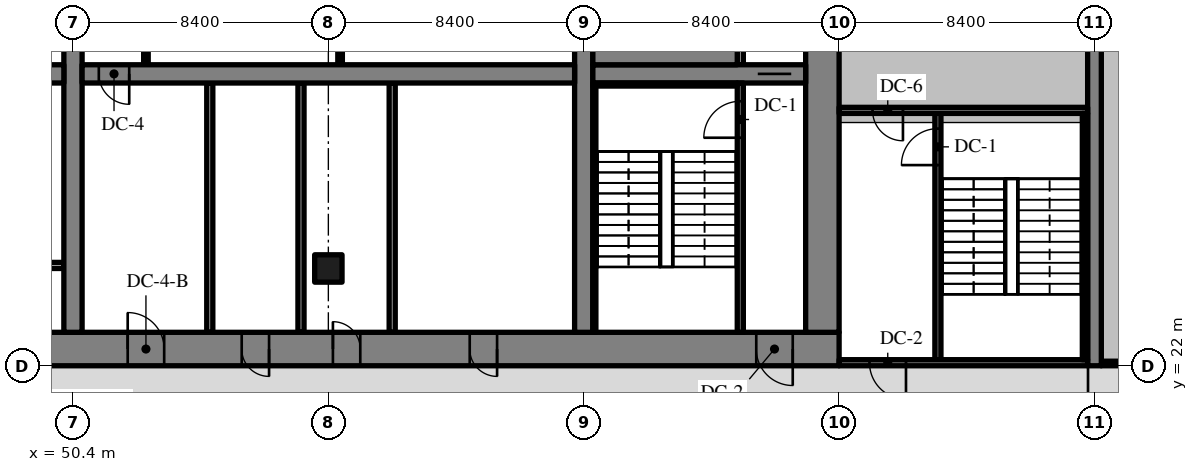
"""IFC4 building model, lengths in metres.
Left out: names, types, materials, properties, quantities, classifications, styles, units other than length and angle.
Written with IfcOpenShell. Run it as: python <this file> out.ifc"""

import sys

from ifc_helpers import new_model, si_unit, direction, frame, frame_2d, origin, origin_2d, place, context, subcontext, project, spatial, rectangle, extrude, source, transform, mapped, element, fill, save


model = new_model("IFC4")
c1 = context("Model", 3, precision=1e-05, world=origin(), true_north=direction((0.0, 1.0)))
c2 = subcontext(c1, "Body", "Model", "MODEL_VIEW")
j1 = project(units=[si_unit("LENGTHUNIT", "METRE"), si_unit("PLANEANGLEUNIT", "RADIAN")], contexts=[c1])
p1 = place(None, origin())
s1 = spatial("IfcSite", under=j1, at=p1, CompositionType="ELEMENT")
p2 = place(p1, origin())
s2 = spatial("IfcBuilding", under=s1, at=p2, CompositionType="ELEMENT")
p3 = place(p2, frame((0.0, 0.0, -9.0)))
s3 = spatial("IfcBuildingStorey", under=s2, at=p3, CompositionType="ELEMENT", Elevation=-9.0)
m1 = source(origin(), c2, "Body", "SweptSolid", [
    extrude(rectangle(XDim=50.4, YDim=1.1, at=frame_2d((25.2, 0.0))), origin(), (0.0, 0.0, 1.0), 4.22),
])
p4 = place(p3, frame((25.2, 22.55, 0.0), z_axis=(0.0, 0.0, 1.0), x_axis=(1.0, 0.0, 0.0)))
e1 = element("IfcWall", 1, at=p4, inside=s3, PredefinedType="SHEAR", context=c2, shape_type="MappedRepresentation", body=[
    mapped(m1, transform((0.0, 0.0, 0.0), scale=1.0)),
])
m2 = source(origin(), c2, "Body", "SweptSolid", [
    extrude(rectangle(XDim=1.8, YDim=2.1, at=frame_2d((0.9, 1.05))), frame((0.0, 0.56, 0.0), z_axis=(0.0, -1.0, 0.0), x_axis=(1.0, 0.0, 0.0)), (0.0, 0.0, 1.0), 1.12),
])
p5 = place(p4, frame((15.9, 0.0, 0.0)))
e2 = element("IfcOpeningElement", 2, at=p5, cuts=e1, PredefinedType="OPENING", context=c2, shape_type="MappedRepresentation", body=[
    mapped(m2, transform((0.0, 0.0, 0.0), scale=1.0)),
])
m3 = source(origin(), c2, "Body", "SweptSolid", [
    extrude(rectangle(XDim=1.2, YDim=2.1, at=frame_2d((0.6, 1.05))), frame((0.0, 0.56, 0.0), z_axis=(0.0, -1.0, 0.0), x_axis=(1.0, 0.0, 0.0)), (0.0, 0.0, 1.0), 1.12),
])
p6 = place(p4, frame((27.0, 0.0, 0.0)))
e3 = element("IfcOpeningElement", 3, at=p6, cuts=e1, PredefinedType="OPENING", context=c2, shape_type="MappedRepresentation", body=[
    mapped(m3, transform((0.0, 0.0, 0.0), scale=1.0)),
])
m4 = source(origin(), c2, "Body", "SweptSolid", [
    extrude(rectangle(XDim=0.9, YDim=2.1, at=frame_2d((0.45, 1.05))), frame((0.0, 0.56, 0.0), z_axis=(0.0, -1.0, 0.0), x_axis=(1.0, 0.0, 0.0)), (0.0, 0.0, 1.0), 1.12),
])
p7 = place(p4, frame((33.75, 0.0, 0.0)))
e4 = element("IfcOpeningElement", 4, at=p7, cuts=e1, PredefinedType="OPENING", context=c2, shape_type="MappedRepresentation", body=[
    mapped(m4, transform((0.0, 0.0, 0.0), scale=1.0)),
])
p8 = place(p4, frame((30.75, 0.0, 0.0)))
e5 = element("IfcOpeningElement", 5, at=p8, cuts=e1, PredefinedType="OPENING", context=c2, shape_type="MappedRepresentation", body=[
    mapped(m4, transform((0.0, 0.0, 0.0), scale=1.0)),
])
p9 = place(p4, frame((38.25, 0.0, 0.0)))
e6 = element("IfcOpeningElement", 6, at=p9, cuts=e1, PredefinedType="OPENING", context=c2, shape_type="MappedRepresentation", body=[
    mapped(m4, transform((0.0, 0.0, 0.0), scale=1.0)),
])
p10 = place(p4, frame((6.425, 0.0, 0.0)))
e7 = element("IfcOpeningElement", 7, at=p10, cuts=e1, PredefinedType="OPENING", context=c2, shape_type="MappedRepresentation", body=[
    mapped(m3, transform((0.0, 0.0, 0.0), scale=1.0)),
])
p11 = place(p4, frame((47.675, 0.0, 0.0)))
e8 = element("IfcOpeningElement", 8, at=p11, cuts=e1, PredefinedType="OPENING", context=c2, shape_type="MappedRepresentation", body=[
    mapped(m3, transform((0.0, 0.0, 0.0), scale=1.0)),
])
m5 = source(origin(), c2, "Body", "SweptSolid", [
    extrude(rectangle(XDim=17.8, YDim=1.1, at=frame_2d((8.9, 0.0))), origin(), (0.0, 0.0, 1.0), 4.22),
])
p12 = place(p3, frame((75.05, 23.1, 0.0), z_axis=(0.0, 0.0, 1.0), x_axis=(0.0, 1.0, 0.0)))
e9 = element("IfcWall", 9, at=p12, inside=s3, PredefinedType="SHEAR", context=c2, shape_type="MappedRepresentation", body=[
    mapped(m5, transform((0.0, 0.0, 0.0), scale=1.0)),
])
m6 = source(origin(), c2, "Body", "SweptSolid", [
    extrude(rectangle(XDim=17.8, YDim=0.6, at=frame_2d((8.9, 0.0))), origin(), (0.0, 0.0, 1.0), 4.22),
])
p13 = place(p3, frame((50.4, 23.1, 0.0), z_axis=(0.0, 0.0, 1.0), x_axis=(0.0, 1.0, 0.0)))
e10 = element("IfcWall", 10, at=p13, inside=s3, PredefinedType="SHEAR", context=c2, shape_type="MappedRepresentation", body=[
    mapped(m6, transform((0.0, 0.0, 0.0), scale=1.0)),
])
m7 = source(origin(), c2, "Body", "SweptSolid", [
    extrude(rectangle(XDim=1.1, YDim=2.1, at=frame_2d((0.55, 1.05))), frame((0.0, 0.31, 0.0), z_axis=(0.0, -1.0, 0.0), x_axis=(1.0, 0.0, 0.0)), (0.0, 0.0, 1.0), 0.62),
])
p14 = place(p13, frame((12.35, 0.0, 0.0)))
e11 = element("IfcOpeningElement", 11, at=p14, cuts=e10, PredefinedType="OPENING", context=c2, shape_type="MappedRepresentation", body=[
    mapped(m7, transform((0.0, 0.0, 0.0), scale=1.0)),
])
p15 = place(p3, frame((67.2, 23.1, 0.0), z_axis=(0.0, 0.0, 1.0), x_axis=(0.0, 1.0, 0.0)))
e12 = element("IfcWall", 12, at=p15, inside=s3, PredefinedType="SHEAR", context=c2, shape_type="MappedRepresentation", body=[
    mapped(m6, transform((0.0, 0.0, 0.0), scale=1.0)),
])
m8 = source(origin(), c2, "Body", "SweptSolid", [
    extrude(rectangle(XDim=16.2, YDim=0.6, at=frame_2d((8.1, 0.0))), origin(), (0.0, 0.0, 1.0), 4.22),
])
p16 = place(p3, frame((33.9, 31.6, 0.0), z_axis=(0.0, 0.0, 1.0), x_axis=(1.0, 0.0, 0.0)))
e13 = element("IfcWall", 13, at=p16, inside=s3, PredefinedType="SHEAR", context=c2, shape_type="MappedRepresentation", body=[
    mapped(m8, transform((0.0, 0.0, 0.0), scale=1.0)),
])
m9 = source(origin(), c2, "Body", "SweptSolid", [
    extrude(rectangle(XDim=1.0, YDim=2.1, at=frame_2d((0.5, 1.05))), frame((0.0, 0.31, 0.0), z_axis=(0.0, -1.0, 0.0), x_axis=(1.0, 0.0, 0.0)), (0.0, 0.0, 1.0), 0.62),
])
p17 = place(p16, frame((14.65, 0.0, 0.0)))
e14 = element("IfcOpeningElement", 14, at=p17, cuts=e13, PredefinedType="OPENING", context=c2, shape_type="MappedRepresentation", body=[
    mapped(m9, transform((0.0, 0.0, 0.0), scale=1.0)),
])
m10 = source(origin(), c2, "Body", "SweptSolid", [
    extrude(rectangle(XDim=16.2, YDim=0.6, at=frame_2d((8.1, 0.0))), origin(), (0.0, 0.0, 1.0), 4.22),
])
p18 = place(p3, frame((50.7, 31.6, 0.0), z_axis=(0.0, 0.0, 1.0), x_axis=(1.0, 0.0, 0.0)))
e15 = element("IfcWall", 15, at=p18, inside=s3, PredefinedType="SHEAR", context=c2, shape_type="MappedRepresentation", body=[
    mapped(m10, transform((0.0, 0.0, 0.0), scale=1.0)),
])
p19 = place(p18, frame((0.55, 0.0, 0.0)))
e16 = element("IfcOpeningElement", 16, at=p19, cuts=e15, PredefinedType="OPENING", context=c2, shape_type="MappedRepresentation", body=[
    mapped(m9, transform((0.0, 0.0, 0.0), scale=1.0)),
])
m11 = source(origin(), c2, "Body", "SweptSolid", [
    extrude(rectangle(XDim=7.0, YDim=0.6, at=frame_2d((3.5, 0.0))), origin(), (0.0, 0.0, 1.0), 4.22),
])
p20 = place(p3, frame((67.5, 31.6, 0.0), z_axis=(0.0, 0.0, 1.0), x_axis=(1.0, 0.0, 0.0)))
e17 = element("IfcWall", 17, at=p20, inside=s3, PredefinedType="SHEAR", context=c2, shape_type="MappedRepresentation", body=[
    mapped(m11, transform((0.0, 0.0, 0.0), scale=1.0)),
])
p21 = place(p20, frame((5.425, 0.0, 0.0)))
e18 = element("IfcOpeningElement", 18, at=p21, cuts=e17, PredefinedType="OPENING", context=c2, shape_type="MappedRepresentation", body=[
    mapped(m7, transform((0.0, 0.0, 0.0), scale=1.0)),
])
m12 = source(origin(), c2, "Body", "SweptSolid", [
    extrude(rectangle(XDim=20.0, YDim=0.45, at=frame_2d((10.0, 0.0))), origin(), (0.0, 0.0, 1.0), 4.22),
])
p22 = place(p3, frame((84.0, 22.0, 0.0), z_axis=(0.0, 0.0, 1.0), x_axis=(0.0, 1.0, 0.0)))
e19 = element("IfcWall", 19, at=p22, inside=s3, PredefinedType="SHEAR", context=c2, shape_type="MappedRepresentation", body=[
    mapped(m12, transform((0.0, 0.0, 0.0), scale=1.0)),
])
m13 = source(origin(), c2, "Body", "SweptSolid", [
    extrude(rectangle(XDim=0.9, YDim=0.9, at=origin_2d()), origin(), (0.0, 0.0, 1.0), 4.22),
])
p23 = place(p3, frame((58.8, 25.2, 0.0), z_axis=(0.0, 0.0, 1.0), x_axis=(1.0, 0.0, 0.0)))
e20 = element("IfcColumn", 20, at=p23, inside=s3, PredefinedType="COLUMN", context=c2, shape_type="MappedRepresentation", body=[
    mapped(m13, transform((0.0, 0.0, 0.0), scale=1.0)),
])
m14 = source(origin(), c2, "Body", "SweptSolid", [
    extrude(rectangle(XDim=6.0, YDim=0.2, at=frame_2d((3.0, 0.0))), origin(), (0.0, 0.0, 1.0), 4.22),
])
p24 = place(p3, frame((44.1, 25.3, 0.0), z_axis=(0.0, 0.0, 1.0), x_axis=(1.0, 0.0, 0.0)))
e21 = element("IfcWall", 21, at=p24, inside=s3, PredefinedType="SOLIDWALL", context=c2, shape_type="MappedRepresentation", body=[
    mapped(m14, transform((0.0, 0.0, 0.0), scale=1.0)),
])
m15 = source(origin(), c2, "Body", "SweptSolid", [
    extrude(rectangle(XDim=1.1, YDim=2.1, at=frame_2d((0.55, 1.05))), frame((0.0, 0.11, 0.0), z_axis=(0.0, -1.0, 0.0), x_axis=(1.0, 0.0, 0.0)), (0.0, 0.0, 1.0), 0.22),
])
p25 = place(p24, frame((0.95, 0.0, 0.0)))
e22 = element("IfcOpeningElement", 22, at=p25, cuts=e21, PredefinedType="OPENING", context=c2, shape_type="MappedRepresentation", body=[
    mapped(m15, transform((0.0, 0.0, 0.0), scale=1.0)),
])
p26 = place(p24, frame((3.95, 0.0, 0.0)))
e23 = element("IfcOpeningElement", 23, at=p26, cuts=e21, PredefinedType="OPENING", context=c2, shape_type="MappedRepresentation", body=[
    mapped(m15, transform((0.0, 0.0, 0.0), scale=1.0)),
])
m16 = source(origin(), c2, "Body", "SweptSolid", [
    extrude(rectangle(XDim=8.2, YDim=0.2, at=frame_2d((4.1, 0.0))), origin(), (0.0, 0.0, 1.0), 4.22),
])
for number, where, z_axis, x_axis in (
    (24, (54.9, 23.1, 0.0), (0.0, 0.0, 1.0), (0.0, 1.0, 0.0)),
    (25, (60.9, 23.1, 0.0), (0.0, 0.0, 1.0), (0.0, 1.0, 0.0)),
    (26, (57.9, 23.1, 0.0), (0.0, 0.0, 1.0), (0.0, 1.0, 0.0)),
):
    element("IfcWall", number, at=place(p3, frame(where, z_axis=z_axis, x_axis=x_axis)), inside=s3, PredefinedType="PARTITIONING", context=c2, shape_type="MappedRepresentation", body=[
        mapped(m16, transform((0.0, 0.0, 0.0), scale=1.0)),
    ])
m17 = source(origin(), c2, "Body", "SweptSolid", [
    extrude(rectangle(XDim=3.1, YDim=0.15, at=frame_2d((1.55, 0.0))), origin(), (0.0, 0.0, 1.0), 4.22),
])
for number, where, z_axis, x_axis in (
    (27, (52.8, 31.9, 0.0), (0.0, 0.0, 1.0), (0.0, 1.0, 0.0)),
    (28, (59.186, 31.9, 0.0), (0.0, 0.0, 1.0), (0.0, 1.0, 0.0)),
):
    element("IfcWall", number, at=place(p3, frame(where, z_axis=z_axis, x_axis=x_axis)), inside=s3, PredefinedType="PARTITIONING", context=c2, shape_type="MappedRepresentation", body=[
        mapped(m17, transform((0.0, 0.0, 0.0), scale=1.0)),
    ])
m18 = source(origin(), c2, "Body", "SweptSolid", [
    extrude(rectangle(XDim=8.2, YDim=0.2, at=frame_2d((4.1, 0.0))), origin(), (0.0, 0.0, 1.0), 4.22),
])
p27 = place(p3, frame((72.35, 23.1, 0.0), z_axis=(0.0, 0.0, 1.0), x_axis=(0.0, 1.0, 0.0)))
e29 = element("IfcWall", 29, at=p27, inside=s3, PredefinedType="SOLIDWALL", context=c2, shape_type="MappedRepresentation", body=[
    mapped(m18, transform((0.0, 0.0, 0.0), scale=1.0)),
])
m19 = source(origin(), c2, "Body", "SweptSolid", [
    extrude(rectangle(XDim=1.2, YDim=2.1, at=frame_2d((0.6, 1.05))), frame((0.0, 0.11, 0.0), z_axis=(0.0, -1.0, 0.0), x_axis=(1.0, 0.0, 0.0)), (0.0, 0.0, 1.0), 0.22),
])
p28 = place(p27, frame((6.4, 0.0, 0.0)))
e30 = element("IfcOpeningElement", 30, at=p28, cuts=e29, PredefinedType="OPENING", context=c2, shape_type="MappedRepresentation", body=[
    mapped(m19, transform((0.0, 0.0, 0.0), scale=1.0)),
])
m20 = source(origin(), c2, "Body", "SweptSolid", [
    extrude(rectangle(XDim=1.7, YDim=0.2, at=frame_2d((0.85, 0.0))), origin(), (0.0, 0.0, 1.0), 4.22),
])
p29 = place(p3, frame((72.35, 31.9, 0.0), z_axis=(0.0, 0.0, 1.0), x_axis=(0.0, 1.0, 0.0)))
e31 = element("IfcWall", 31, at=p29, inside=s3, PredefinedType="SOLIDWALL", context=c2, shape_type="MappedRepresentation", body=[
    mapped(m20, transform((0.0, 0.0, 0.0), scale=1.0)),
])
m21 = source(origin(), c2, "Body", "SweptSolid", [
    extrude(rectangle(XDim=8.3, YDim=0.2, at=frame_2d((4.15, 0.0))), origin(), (0.0, 0.0, 1.0), 4.22),
])
p30 = place(p3, frame((78.85, 22.1, 0.0), z_axis=(0.0, 0.0, 1.0), x_axis=(0.0, 1.0, 0.0)))
e32 = element("IfcWall", 32, at=p30, inside=s3, PredefinedType="SOLIDWALL", context=c2, shape_type="MappedRepresentation", body=[
    mapped(m21, transform((0.0, 0.0, 0.0), scale=1.0)),
])
p31 = place(p30, frame((6.5, 0.0, 0.0)))
e33 = element("IfcOpeningElement", 33, at=p31, cuts=e32, PredefinedType="OPENING", context=c2, shape_type="MappedRepresentation", body=[
    mapped(m19, transform((0.0, 0.0, 0.0), scale=1.0)),
])
m22 = source(origin(), c2, "Body", "SweptSolid", [
    extrude(rectangle(XDim=8.175, YDim=0.2, at=frame_2d((4.087, 0.0))), origin(), (0.0, 0.0, 1.0), 4.22),
])
p32 = place(p3, frame((83.775, 22.1, 0.0), z_axis=(0.0, 0.0, 1.0), x_axis=(-1.0, 0.0, 0.0)))
e34 = element("IfcWall", 34, at=p32, inside=s3, PredefinedType="SOLIDWALL", context=c2, shape_type="MappedRepresentation", body=[
    mapped(m22, transform((0.0, 0.0, 0.0), scale=1.0)),
])
p33 = place(p32, frame((5.975, 0.0, 0.0)))
e35 = element("IfcOpeningElement", 35, at=p33, cuts=e34, PredefinedType="OPENING", context=c2, shape_type="MappedRepresentation", body=[
    mapped(m19, transform((0.0, 0.0, 0.0), scale=1.0)),
])
p34 = place(p3, frame((83.775, 30.4, 0.0), z_axis=(0.0, 0.0, 1.0), x_axis=(-1.0, 0.0, 0.0)))
e36 = element("IfcWall", 36, at=p34, inside=s3, PredefinedType="SOLIDWALL", context=c2, shape_type="MappedRepresentation", body=[
    mapped(m22, transform((0.0, 0.0, 0.0), scale=1.0)),
])
m23 = source(origin(), c2, "Body", "SweptSolid", [
    extrude(rectangle(XDim=1.0, YDim=2.1, at=frame_2d((0.5, 1.05))), frame((0.0, 0.11, 0.0), z_axis=(0.0, -1.0, 0.0), x_axis=(1.0, 0.0, 0.0)), (0.0, 0.0, 1.0), 0.22),
])
p35 = place(p34, frame((6.075, 0.0, 0.0)))
e37 = element("IfcOpeningElement", 37, at=p35, cuts=e36, PredefinedType="OPENING", context=c2, shape_type="MappedRepresentation", body=[
    mapped(m23, transform((0.0, 0.0, 0.0), scale=1.0)),
])
m24 = source(origin(), c2, "Body", "SweptSolid", [
    extrude(rectangle(XDim=4.75, YDim=0.1, at=frame_2d((2.375, 0.0))), origin(), (0.0, 0.0, 1.0), 4.22),
])
p36 = place(p3, frame((67.5, 31.25, 0.0), z_axis=(0.0, 0.0, 1.0), x_axis=(1.0, 0.0, 0.0)))
e38 = element("IfcWall", 38, at=p36, inside=s3, PredefinedType="SOLIDWALL", context=c2, shape_type="MappedRepresentation", body=[
    mapped(m24, transform((0.0, 0.0, 0.0), scale=1.0)),
])
m25 = source(origin(), c2, "Body", "SweptSolid", [
    extrude(rectangle(XDim=8.1, YDim=0.1, at=frame_2d((4.05, 0.0))), origin(), (0.0, 0.0, 1.0), 4.22),
])
p37 = place(p3, frame((67.55, 23.1, 0.0), z_axis=(0.0, 0.0, 1.0), x_axis=(0.0, 1.0, 0.0)))
e39 = element("IfcWall", 39, at=p37, inside=s3, PredefinedType="SOLIDWALL", context=c2, shape_type="MappedRepresentation", body=[
    mapped(m25, transform((0.0, 0.0, 0.0), scale=1.0)),
])
m26 = source(origin(), c2, "Body", "SweptSolid", [
    extrude(rectangle(XDim=4.75, YDim=0.9, at=frame_2d((2.375, 0.0))), origin(), (0.0, 0.0, 1.0), 4.22),
])
p38 = place(p3, frame((67.5, 32.35, 0.0), z_axis=(0.0, 0.0, 1.0), x_axis=(1.0, 0.0, 0.0)))
e40 = element("IfcWall", 40, at=p38, inside=s3, PredefinedType="SOLIDWALL", context=c2, shape_type="MappedRepresentation", body=[
    mapped(m26, transform((0.0, 0.0, 0.0), scale=1.0)),
])
m27 = source(origin(), c2, "Body", "SweptSolid", [
    extrude(rectangle(XDim=8.1, YDim=0.175, at=frame_2d((4.05, 0.0))), origin(), (0.0, 0.0, 1.0), 4.22),
])
p39 = place(p3, frame((83.688, 22.2, 0.0), z_axis=(0.0, 0.0, 1.0), x_axis=(0.0, 1.0, 0.0)))
e41 = element("IfcWall", 41, at=p39, inside=s3, PredefinedType="SOLIDWALL", context=c2, shape_type="MappedRepresentation", body=[
    mapped(m27, transform((0.0, 0.0, 0.0), scale=1.0)),
])
m28 = source(origin(), c2, "Body", "SweptSolid", [
    extrude(rectangle(XDim=7.95, YDim=0.15, at=frame_2d((3.975, 0.0))), origin(), (0.0, 0.0, 1.0), 4.22),
])
p40 = place(p3, frame((84.225, 22.075, 0.0), z_axis=(0.0, 0.0, 1.0), x_axis=(1.0, 0.0, 0.0)))
e42 = element("IfcWall", 42, at=p40, inside=s3, PredefinedType="PARTITIONING", context=c2, shape_type="MappedRepresentation", body=[
    mapped(m28, transform((0.0, 0.0, 0.0), scale=1.0)),
])
m29 = source(origin(), c2, "Body", "SweptSolid", [
    extrude(rectangle(XDim=1.2, YDim=2.1, at=frame_2d((0.6, 1.05))), frame((0.0, 0.325, 0.0), z_axis=(0.0, -1.0, 0.0), x_axis=(1.0, 0.0, 0.0)), (0.0, 0.0, 1.0), 0.05),
])
p41 = place(p6, origin())
e43 = element("IfcDoor", 43, at=p41, inside=s3, OperationType="SINGLE_SWING_LEFT", PredefinedType="DOOR", context=c2, shape_type="MappedRepresentation", body=[
    mapped(m29, transform((0.0, 0.0, 0.0), scale=1.0)),
])
fill(e3, e43)
m30 = source(origin(), c2, "Body", "SweptSolid", [
    extrude(rectangle(XDim=1.0, YDim=2.1, at=frame_2d((0.5, 1.05))), frame((0.0, 0.025, 0.0), z_axis=(0.0, -1.0, 0.0), x_axis=(1.0, 0.0, 0.0)), (0.0, 0.0, 1.0), 0.05),
])
p42 = place(p19, origin())
e44 = element("IfcDoor", 44, at=p42, inside=s3, OperationType="SINGLE_SWING_RIGHT", PredefinedType="DOOR", context=c2, shape_type="MappedRepresentation", body=[
    mapped(m30, transform((0.0, 0.0, 0.0), scale=1.0)),
])
fill(e16, e44)
m31 = source(origin(), c2, "Body", "SweptSolid", [
    extrude(rectangle(XDim=0.9, YDim=2.1, at=frame_2d((0.45, 1.05))), frame((0.0, 0.325, 0.0), z_axis=(0.0, -1.0, 0.0), x_axis=(1.0, 0.0, 0.0)), (0.0, 0.0, 1.0), 0.05),
])
p43 = place(p7, origin())
e45 = element("IfcDoor", 45, at=p43, inside=s3, OperationType="SINGLE_SWING_LEFT", PredefinedType="DOOR", context=c2, shape_type="MappedRepresentation", body=[
    mapped(m31, transform((0.0, 0.0, 0.0), scale=1.0)),
])
fill(e4, e45)
p44 = place(p8, origin())
e46 = element("IfcDoor", 46, at=p44, inside=s3, OperationType="SINGLE_SWING_RIGHT", PredefinedType="DOOR", context=c2, shape_type="MappedRepresentation", body=[
    mapped(m31, transform((0.0, 0.0, 0.0), scale=1.0)),
])
fill(e5, e46)
p45 = place(p9, origin())
e47 = element("IfcDoor", 47, at=p45, inside=s3, OperationType="SINGLE_SWING_RIGHT", PredefinedType="DOOR", context=c2, shape_type="MappedRepresentation", body=[
    mapped(m31, transform((0.0, 0.0, 0.0), scale=1.0)),
])
fill(e6, e47)
m32 = source(origin(), c2, "Body", "SweptSolid", [
    extrude(rectangle(XDim=1.2, YDim=2.1, at=frame_2d((0.6, 1.05))), frame((0.0, 0.025, 0.0), z_axis=(0.0, -1.0, 0.0), x_axis=(1.0, 0.0, 0.0)), (0.0, 0.0, 1.0), 0.05),
])
p46 = place(p28, origin())
e48 = element("IfcDoor", 48, at=p46, inside=s3, OperationType="SINGLE_SWING_LEFT", PredefinedType="DOOR", context=c2, shape_type="MappedRepresentation", body=[
    mapped(m32, transform((0.0, 0.0, 0.0), scale=1.0)),
])
fill(e30, e48)
p47 = place(p11, origin())
e49 = element("IfcDoor", 49, at=p47, inside=s3, OperationType="SINGLE_SWING_RIGHT", PredefinedType="DOOR", context=c2, shape_type="MappedRepresentation", body=[
    mapped(m29, transform((0.0, 0.0, 0.0), scale=1.0)),
])
fill(e8, e49)
m33 = source(origin(), c2, "Body", "SweptSolid", [
    extrude(rectangle(XDim=1.1, YDim=2.1, at=frame_2d((0.55, 1.05))), frame((0.0, 0.025, 0.0), z_axis=(0.0, -1.0, 0.0), x_axis=(1.0, 0.0, 0.0)), (0.0, 0.0, 1.0), 0.05),
])
p48 = place(p21, origin())
e50 = element("IfcDoor", 50, at=p48, inside=s3, OperationType="SLIDING_TO_RIGHT", PredefinedType="DOOR", context=c2, shape_type="MappedRepresentation", body=[
    mapped(m33, transform((0.0, 0.0, 0.0), scale=1.0)),
])
fill(e18, e50)
p49 = place(p31, origin())
e51 = element("IfcDoor", 51, at=p49, inside=s3, OperationType="SINGLE_SWING_LEFT", PredefinedType="DOOR", context=c2, shape_type="MappedRepresentation", body=[
    mapped(m32, transform((0.0, 0.0, 0.0), scale=1.0)),
])
fill(e33, e51)
p50 = place(p33, origin())
e52 = element("IfcDoor", 52, at=p50, inside=s3, OperationType="SINGLE_SWING_LEFT", PredefinedType="DOOR", context=c2, shape_type="MappedRepresentation", body=[
    mapped(m32, transform((0.0, 0.0, 0.0), scale=1.0)),
])
fill(e35, e52)
p51 = place(p35, origin())
e53 = element("IfcDoor", 53, at=p51, inside=s3, OperationType="SINGLE_SWING_LEFT", PredefinedType="DOOR", context=c2, shape_type="MappedRepresentation", body=[
    mapped(m30, transform((0.0, 0.0, 0.0), scale=1.0)),
])
fill(e37, e53)
save(model, sys.argv[1])
